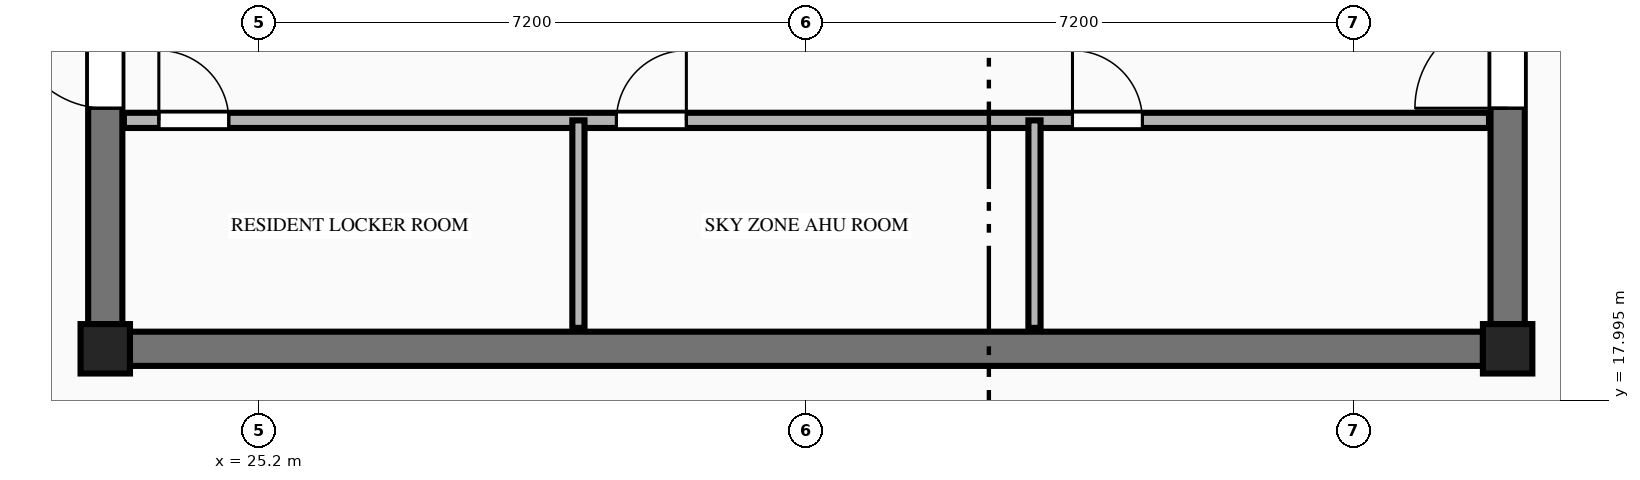
"""IFC4 building model, lengths in metres.
Left out: names, types, materials, properties, quantities, classifications, styles, units other than length and angle.
Written with IfcOpenShell. Run it as: python <this file> out.ifc"""

import sys

from ifc_helpers import new_model, si_unit, direction, frame, frame_2d, origin, origin_2d, place, context, subcontext, project, spatial, rectangle, extrude, element, fill, save


model = new_model("IFC4")
c1 = context("Model", 3, precision=1e-05, world=origin(), true_north=direction((0.0, 1.0)))
c2 = subcontext(c1, "Body", "Model", "MODEL_VIEW")
j1 = project(units=[si_unit("LENGTHUNIT", "METRE"), si_unit("PLANEANGLEUNIT", "RADIAN")], contexts=[c1])
p1 = place(None, origin())
s1 = spatial("IfcSite", under=j1, at=p1, CompositionType="ELEMENT")
p2 = place(p1, origin())
s2 = spatial("IfcBuilding", under=s1, at=p2, CompositionType="ELEMENT")
p3 = place(p2, frame((0.0, 0.0, 241.6)))
s3 = spatial("IfcBuildingStorey", under=s2, at=p3, CompositionType="ELEMENT", Elevation=241.6)
for number, where, z_axis, x_axis in (
    (1, (23.175, 18.675, 0.0), (0.0, 0.0, 1.0), (1.0, 0.0, 0.0)),
    (2, (41.625, 18.675, 0.0), (0.0, 0.0, 1.0), (1.0, 0.0, 0.0)),
):
    element("IfcColumn", number, at=place(p3, frame(where, z_axis=z_axis, x_axis=x_axis)), inside=s3, PredefinedType="COLUMN", context=c2, shape_type="SweptSolid", body=[
        extrude(rectangle(XDim=0.65, YDim=0.65, at=origin_2d()), origin(), (0.0, 0.0, 1.0), 3.65),
    ])
p4 = place(p3, frame((23.5, 18.675, 0.0), z_axis=(0.0, 0.0, 1.0), x_axis=(1.0, 0.0, 0.0)))
e3 = element("IfcWall", 3, at=p4, inside=s3, PredefinedType="SHEAR", context=c2, shape_type="SweptSolid", body=[
    extrude(rectangle(XDim=17.8, YDim=0.45, at=frame_2d((8.9, 0.0))), origin(), (0.0, 0.0, 1.0), 3.45),
])
p5 = place(p3, frame((23.175, 19.0, 0.0), z_axis=(0.0, 0.0, 1.0), x_axis=(0.0, 1.0, 0.0)))
e4 = element("IfcWall", 4, at=p5, inside=s3, PredefinedType="SHEAR", context=c2, shape_type="SweptSolid", body=[
    extrude(rectangle(XDim=13.8, YDim=0.45, at=frame_2d((6.9, 0.0))), origin(), (0.0, 0.0, 1.0), 3.45),
])
p6 = place(p5, frame((2.84, 0.0, 0.0)))
e5 = element("IfcOpeningElement", 5, at=p6, cuts=e4, PredefinedType="OPENING", context=c2, shape_type="SweptSolid", body=[
    extrude(rectangle(XDim=1.22, YDim=2.25, at=frame_2d((0.61, 1.125))), frame((0.0, 0.235, 0.0), z_axis=(0.0, -1.0, 0.0), x_axis=(1.0, 0.0, 0.0)), (0.0, 0.0, 1.0), 0.47),
])
p7 = place(p3, frame((41.625, 19.0, 0.0), z_axis=(0.0, 0.0, 1.0), x_axis=(0.0, 1.0, 0.0)))
e6 = element("IfcWall", 6, at=p7, inside=s3, PredefinedType="SHEAR", context=c2, shape_type="SweptSolid", body=[
    extrude(rectangle(XDim=13.8, YDim=0.45, at=frame_2d((6.9, 0.0))), origin(), (0.0, 0.0, 1.0), 3.45),
])
p8 = place(p7, frame((2.84, 0.0, 0.0)))
e7 = element("IfcOpeningElement", 7, at=p8, cuts=e6, PredefinedType="OPENING", context=c2, shape_type="SweptSolid", body=[
    extrude(rectangle(XDim=1.22, YDim=2.25, at=frame_2d((0.61, 1.125))), frame((0.0, 0.235, 0.0), z_axis=(0.0, -1.0, 0.0), x_axis=(1.0, 0.0, 0.0)), (0.0, 0.0, 1.0), 0.47),
])
p9 = place(p3, frame((23.42, 21.68, 0.0), z_axis=(0.0, 0.0, 1.0), x_axis=(1.0, 0.0, 0.0)))
e8 = element("IfcWall", 8, at=p9, inside=s3, PredefinedType="PLUMBINGWALL", context=c2, shape_type="SweptSolid", body=[
    extrude(rectangle(XDim=17.96, YDim=0.2, at=frame_2d((8.98, 0.0))), origin(), (0.0, 0.0, 1.0), 3.45),
])
p10 = place(p9, frame((0.46, 0.0, 0.0)))
e9 = element("IfcOpeningElement", 9, at=p10, cuts=e8, PredefinedType="OPENING", context=c2, shape_type="SweptSolid", body=[
    extrude(rectangle(XDim=0.92, YDim=2.15, at=frame_2d((0.46, 1.075))), frame((0.0, 0.11, 0.0), z_axis=(0.0, -1.0, 0.0), x_axis=(1.0, 0.0, 0.0)), (0.0, 0.0, 1.0), 0.22),
])
p11 = place(p9, frame((6.48, 0.0, 0.0)))
e10 = element("IfcOpeningElement", 10, at=p11, cuts=e8, PredefinedType="OPENING", context=c2, shape_type="SweptSolid", body=[
    extrude(rectangle(XDim=0.92, YDim=2.15, at=frame_2d((0.46, 1.075))), frame((0.0, 0.11, 0.0), z_axis=(0.0, -1.0, 0.0), x_axis=(1.0, 0.0, 0.0)), (0.0, 0.0, 1.0), 0.22),
])
p12 = place(p9, frame((12.48, 0.0, 0.0)))
e11 = element("IfcOpeningElement", 11, at=p12, cuts=e8, PredefinedType="OPENING", context=c2, shape_type="SweptSolid", body=[
    extrude(rectangle(XDim=0.92, YDim=2.15, at=frame_2d((0.46, 1.075))), frame((0.0, 0.11, 0.0), z_axis=(0.0, -1.0, 0.0), x_axis=(1.0, 0.0, 0.0)), (0.0, 0.0, 1.0), 0.22),
])
for number, where, z_axis, x_axis in (
    (12, (29.4, 18.95, 0.0), (0.0, 0.0, 1.0), (0.0, 1.0, 0.0)),
    (13, (35.4, 18.95, 0.0), (0.0, 0.0, 1.0), (0.0, 1.0, 0.0)),
):
    element("IfcWall", number, at=place(p3, frame(where, z_axis=z_axis, x_axis=x_axis)), inside=s3, PredefinedType="PARTITIONING", context=c2, shape_type="SweptSolid", body=[
        extrude(rectangle(XDim=2.73, YDim=0.16, at=frame_2d((1.365, 0.0))), origin(), (0.0, 0.0, 1.0), 3.45),
    ])
p13 = place(p6, origin())
e14 = element("IfcDoor", 14, at=p13, inside=s3, OperationType="SINGLE_SWING_RIGHT", PredefinedType="DOOR", context=c2, shape_type="SweptSolid", body=[
    extrude(rectangle(XDim=1.22, YDim=2.25, at=frame_2d((0.61, 1.125))), frame((0.0, 0.025, 0.0), z_axis=(0.0, -1.0, 0.0), x_axis=(1.0, 0.0, 0.0)), (0.0, 0.0, 1.0), 0.05),
])
fill(e5, e14)
p14 = place(p8, origin())
e15 = element("IfcDoor", 15, at=p14, inside=s3, OperationType="SINGLE_SWING_LEFT", PredefinedType="DOOR", context=c2, shape_type="SweptSolid", body=[
    extrude(rectangle(XDim=1.22, YDim=2.25, at=frame_2d((0.61, 1.125))), frame((0.0, 0.025, 0.0), z_axis=(0.0, -1.0, 0.0), x_axis=(1.0, 0.0, 0.0)), (0.0, 0.0, 1.0), 0.05),
])
fill(e7, e15)
p15 = place(p10, origin())
e16 = element("IfcDoor", 16, at=p15, inside=s3, OperationType="SINGLE_SWING_LEFT", PredefinedType="DOOR", context=c2, shape_type="SweptSolid", body=[
    extrude(rectangle(XDim=0.92, YDim=2.15, at=frame_2d((0.46, 1.075))), frame((0.0, 0.025, 0.0), z_axis=(0.0, -1.0, 0.0), x_axis=(1.0, 0.0, 0.0)), (0.0, 0.0, 1.0), 0.05),
])
fill(e9, e16)
p16 = place(p11, origin())
e17 = element("IfcDoor", 17, at=p16, inside=s3, OperationType="SINGLE_SWING_RIGHT", PredefinedType="DOOR", context=c2, shape_type="SweptSolid", body=[
    extrude(rectangle(XDim=0.92, YDim=2.15, at=frame_2d((0.46, 1.075))), frame((0.0, 0.025, 0.0), z_axis=(0.0, -1.0, 0.0), x_axis=(1.0, 0.0, 0.0)), (0.0, 0.0, 1.0), 0.05),
])
fill(e10, e17)
p17 = place(p12, origin())
e18 = element("IfcDoor", 18, at=p17, inside=s3, OperationType="SINGLE_SWING_LEFT", PredefinedType="DOOR", context=c2, shape_type="SweptSolid", body=[
    extrude(rectangle(XDim=0.92, YDim=2.15, at=frame_2d((0.46, 1.075))), frame((0.0, 0.025, 0.0), z_axis=(0.0, -1.0, 0.0), x_axis=(1.0, 0.0, 0.0)), (0.0, 0.0, 1.0), 0.05),
])
fill(e11, e18)
save(model, sys.argv[1])
